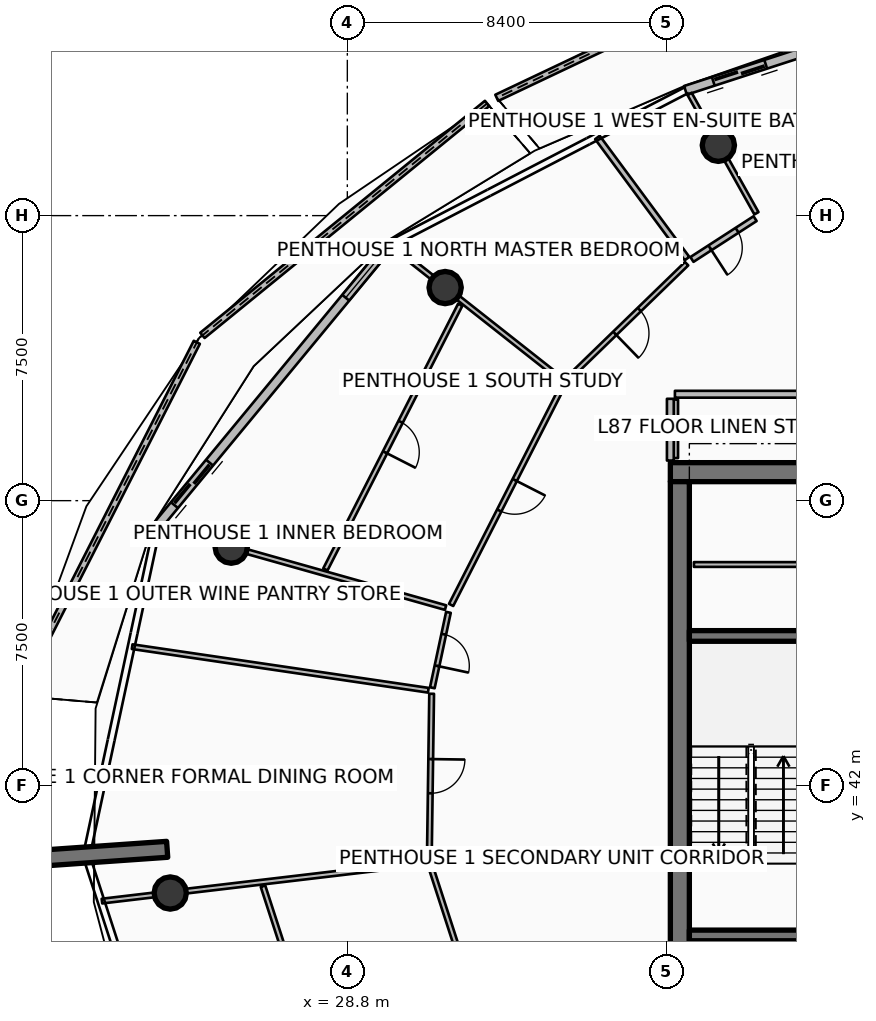
"""IFC4 building model, lengths in metres.
Left out: names, types, materials, properties, quantities, classifications, styles, units other than length and angle.
Written with IfcOpenShell. Run it as: python <this file> out.ifc"""

import sys

from ifc_helpers import new_model, si_unit, direction, frame, frame_2d, origin, origin_2d, place, context, subcontext, project, spatial, polyline, rectangle, circle, outline, extrude, element, fill, save


model = new_model("IFC4")
c1 = context("Model", 3, precision=1e-05, world=origin(), true_north=direction((0.0, 1.0)))
c2 = subcontext(c1, "Body", "Model", "MODEL_VIEW")
j1 = project(units=[si_unit("LENGTHUNIT", "METRE"), si_unit("PLANEANGLEUNIT", "RADIAN")], contexts=[c1])
p1 = place(None, origin())
s1 = spatial("IfcSite", under=j1, at=p1, CompositionType="ELEMENT")
p2 = place(p1, origin())
s2 = spatial("IfcBuilding", under=s1, at=p2, CompositionType="ELEMENT")
p3 = place(p2, frame((0.0, 0.0, 347.3)))
s3 = spatial("IfcBuildingStorey", under=s2, at=p3, CompositionType="ELEMENT", Elevation=347.3)
p4 = place(p3, frame((37.3, 50.25, 0.0), z_axis=(0.0, 0.0, 1.0), x_axis=(1.0, 0.0, 0.0)))
e1 = element("IfcWall", 1, at=p4, inside=s3, PredefinedType="SHEAR", context=c2, shape_type="SweptSolid", body=[
    extrude(rectangle(XDim=9.6, YDim=0.5, at=frame_2d((4.8, 0.0))), origin(), (0.0, 0.0, 1.0), 4.2),
])
p5 = place(p3, frame((37.55, 34.0, 0.0), z_axis=(0.0, 0.0, 1.0), x_axis=(0.0, 1.0, 0.0)))
e2 = element("IfcWall", 2, at=p5, inside=s3, PredefinedType="SHEAR", context=c2, shape_type="SweptSolid", body=[
    extrude(rectangle(XDim=16.0, YDim=0.5, at=frame_2d((8.0, 0.0))), origin(), (0.0, 0.0, 1.0), 4.2),
])
for number, where, z_axis, x_axis in (
    (3, (37.8, 38.06, 0.0), (0.0, 0.0, 1.0), (1.0, 0.0, 0.0)),
    (4, (37.8, 45.94, 0.0), (0.0, 0.0, 1.0), (1.0, 0.0, 0.0)),
):
    element("IfcWall", number, at=place(p3, frame(where, z_axis=z_axis, x_axis=x_axis)), inside=s3, PredefinedType="SHEAR", context=c2, shape_type="SweptSolid", body=[
        extrude(rectangle(XDim=3.5, YDim=0.28, at=frame_2d((1.75, 0.0))), origin(), (0.0, 0.0, 1.0), 4.2),
    ])
p6 = place(p3, frame((24.059, 40.326, 0.0), z_axis=(0.0, 0.0, 1.0), x_axis=(-0.997564163539, -0.069754853754, 0.0)))
e5 = element("IfcWall", 5, at=p6, inside=s3, PredefinedType="SOLIDWALL", context=c2, shape_type="SweptSolid", body=[
    extrude(rectangle(XDim=3.5, YDim=0.42, at=frame_2d((1.75, 0.0))), origin(), (0.0, 0.0, 1.0), 4.2),
])
p7 = place(p3, frame((38.563, 58.851, 0.0), z_axis=(0.1069476294, -0.19095104288, 0.975756067769), x_axis=(0.872476708142, 0.488655700621, 0.0)))
e6 = element("IfcColumn", 6, at=p7, inside=s3, PredefinedType="COLUMN", context=c2, shape_type="SweptSolid", body=[
    extrude(circle(Radius=0.425, at=origin_2d()), origin(), (0.0, 0.0, 1.0), 3.895),
])
p8 = place(p3, frame((31.374, 55.107, 0.0), z_axis=(0.187539260208, -0.147797906664, 0.971074046953), x_axis=(0.618974809296, 0.785410838642, 0.0)))
e7 = element("IfcColumn", 7, at=p8, inside=s3, PredefinedType="COLUMN", context=c2, shape_type="SweptSolid", body=[
    extrude(circle(Radius=0.425, at=origin_2d()), origin(), (0.0, 0.0, 1.0), 3.913),
])
p9 = place(p3, frame((25.744, 48.277, 0.0), z_axis=(0.249679030359, -0.070361834102, 0.965768913406), x_axis=(0.27124427314, 0.96251054243, 0.0)))
e8 = element("IfcColumn", 8, at=p9, inside=s3, PredefinedType="COLUMN", context=c2, shape_type="SweptSolid", body=[
    extrude(circle(Radius=0.425, at=origin_2d()), origin(), (0.0, 0.0, 1.0), 3.935),
])
p10 = place(p3, frame((24.14, 39.176, 0.0), z_axis=(0.266957826391, 0.031621569144, 0.963189283212), x_axis=(-0.117629213307, 0.993057585529, 0.0)))
e9 = element("IfcColumn", 9, at=p10, inside=s3, PredefinedType="COLUMN", context=c2, shape_type="SweptSolid", body=[
    extrude(circle(Radius=0.425, at=origin_2d()), origin(), (0.0, 0.0, 1.0), 3.945),
])
p11 = place(p3, frame((40.758, 63.905, 0.0), z_axis=(0.0, 0.0, 1.0), x_axis=(-0.903556417481, -0.428469135912, 0.0)))
e10 = element("IfcWall", 10, at=p11, inside=s3, PredefinedType="PARAPET", context=c2, shape_type="SweptSolid", body=[
    extrude(outline(polyline([(0.0, 0.0), (8.882, 0.0), (8.882, 1.233), (4.441, 1.418), (0.0, 1.632), (0.0, 0.0)])), frame((0.0, 0.09, 0.0), z_axis=(0.0, -1.0, 0.0), x_axis=(1.0, 0.0, 0.0)), (0.0, 0.0, 1.0), 0.18),
])
p12 = place(p3, frame((32.478, 59.951, 0.0), z_axis=(0.0, 0.0, 1.0), x_axis=(-0.775308764642, -0.631582393255, 0.0)))
e11 = element("IfcWall", 11, at=p12, inside=s3, PredefinedType="PARAPET", context=c2, shape_type="SweptSolid", body=[
    extrude(outline(polyline([(0.0, 0.0), (9.662, 0.0), (9.662, 1.148), (4.831, 1.127), (0.0, 1.224), (0.0, 0.0)])), frame((0.0, 0.09, 0.0), z_axis=(0.0, -1.0, 0.0), x_axis=(1.0, 0.0, 0.0)), (0.0, 0.0, 1.0), 0.18),
])
p13 = place(p3, frame((24.84, 53.666, 0.0), z_axis=(0.0, 0.0, 1.0), x_axis=(-0.453352558269, -0.891331284041, 0.0)))
e12 = element("IfcWall", 12, at=p13, inside=s3, PredefinedType="PARAPET", context=c2, shape_type="SweptSolid", body=[
    extrude(outline(polyline([(0.0, 0.0), (10.433, 0.0), (10.433, 1.483), (5.217, 1.284), (0.0, 1.148), (0.0, 0.0)])), frame((0.0, 0.09, 0.0), z_axis=(0.0, -1.0, 0.0), x_axis=(1.0, 0.0, 0.0)), (0.0, 0.0, 1.0), 0.18),
])
p14 = place(p3, frame((45.581, 62.857, 0.0), z_axis=(0.0, 0.0, 1.0), x_axis=(-0.951053547111, -0.309026132434, 0.0)))
e13 = element("IfcWall", 13, at=p14, inside=s3, PredefinedType="SOLIDWALL", context=c2, shape_type="SweptSolid", body=[
    extrude(rectangle(XDim=8.289, YDim=0.24, at=frame_2d((4.145, 0.0))), origin(), (0.0, 0.0, 1.0), 2.75),
])
p15 = place(p14, frame((6.069, 0.0, 0.0)))
e14 = element("IfcOpeningElement", 14, at=p15, cuts=e13, PredefinedType="OPENING", context=c2, shape_type="SweptSolid", body=[
    extrude(rectangle(XDim=1.45, YDim=2.15, at=frame_2d((0.725, 1.075))), frame((0.0, 0.13, 0.0), z_axis=(0.0, -1.0, 0.0), x_axis=(1.0, 0.0, 0.0)), (0.0, 0.0, 1.0), 0.26),
])
p16 = place(p14, frame((0.28, 0.0, 0.65)))
e15 = element("IfcOpeningElement", 15, at=p16, cuts=e13, PredefinedType="OPENING", context=c2, shape_type="SweptSolid", body=[
    extrude(rectangle(XDim=1.6, YDim=1.5, at=frame_2d((0.8, 0.75))), frame((0.0, 0.13, 0.0), z_axis=(0.0, -1.0, 0.0), x_axis=(1.0, 0.0, 0.0)), (0.0, 0.0, 1.0), 0.26),
])
p17 = place(p3, frame((29.955, 56.289, 0.0), z_axis=(0.0, 0.0, 1.0), x_axis=(-0.636803612721, -0.771026042897, 0.0)))
e16 = element("IfcWall", 16, at=p17, inside=s3, PredefinedType="SOLIDWALL", context=c2, shape_type="SweptSolid", body=[
    extrude(rectangle(XDim=9.728, YDim=0.24, at=frame_2d((4.864, 0.0))), origin(), (0.0, 0.0, 1.0), 2.75),
])
p18 = place(p17, frame((7.508, 0.0, 0.0)))
e17 = element("IfcOpeningElement", 17, at=p18, cuts=e16, PredefinedType="OPENING", context=c2, shape_type="SweptSolid", body=[
    extrude(rectangle(XDim=1.45, YDim=2.15, at=frame_2d((0.725, 1.075))), frame((0.0, 0.13, 0.0), z_axis=(0.0, -1.0, 0.0), x_axis=(1.0, 0.0, 0.0)), (0.0, 0.0, 1.0), 0.26),
])
p19 = place(p17, frame((0.28, 0.0, 0.65)))
e18 = element("IfcOpeningElement", 18, at=p19, cuts=e16, PredefinedType="OPENING", context=c2, shape_type="SweptSolid", body=[
    extrude(rectangle(XDim=1.6, YDim=1.5, at=frame_2d((0.8, 0.75))), frame((0.0, 0.13, 0.0), z_axis=(0.0, -1.0, 0.0), x_axis=(1.0, 0.0, 0.0)), (0.0, 0.0, 1.0), 0.26),
])
p20 = place(p3, frame((37.92, 47.82, 0.0), z_axis=(0.0, 0.0, 1.0), x_axis=(1.0, 0.0, 0.0)))
e19 = element("IfcWall", 19, at=p20, inside=s3, PredefinedType="PARTITIONING", context=c2, shape_type="SweptSolid", body=[
    extrude(rectangle(XDim=8.78, YDim=0.125, at=frame_2d((4.39, 0.0))), origin(), (0.0, 0.0, 1.0), 3.24),
])
p21 = place(p20, frame((3.965, 0.0, 0.0)))
e20 = element("IfcOpeningElement", 20, at=p21, cuts=e19, PredefinedType="OPENING", context=c2, shape_type="SweptSolid", body=[
    extrude(rectangle(XDim=0.85, YDim=2.06, at=frame_2d((0.425, 1.03))), frame((0.0, 0.073, 0.0), z_axis=(0.0, -1.0, 0.0), x_axis=(1.0, 0.0, 0.0)), (0.0, 0.0, 1.0), 0.145),
])
p22 = place(p3, frame((37.44, 50.62, 0.0), z_axis=(0.0, 0.0, 1.0), x_axis=(0.0, 1.0, 0.0)))
e21 = element("IfcWall", 21, at=p22, inside=s3, PredefinedType="PARTITIONING", context=c2, shape_type="SweptSolid", body=[
    extrude(rectangle(XDim=1.54, YDim=0.125, at=frame_2d((0.77, 0.0))), origin(), (0.0, 0.0, 1.0), 2.757),
])
p23 = place(p3, frame((42.112, 52.3, 0.0), z_axis=(0.0, 0.0, 1.0), x_axis=(-1.0, 0.0, 0.0)))
e22 = element("IfcWall", 22, at=p23, inside=s3, PredefinedType="PARTITIONING", context=c2, shape_type="SweptSolid", body=[
    extrude(rectangle(XDim=4.692, YDim=0.18, at=frame_2d((2.346, 0.0))), origin(), (0.0, 0.0, 1.0), 2.757),
])
p24 = place(p3, frame((37.3, 52.18, 0.0), z_axis=(0.0, 0.0, 1.0), x_axis=(0.0, -1.0, 0.0)))
e23 = element("IfcWall", 23, at=p24, inside=s3, PredefinedType="PARTITIONING", context=c2, shape_type="SweptSolid", body=[
    extrude(rectangle(XDim=1.625, YDim=0.18, at=frame_2d((0.812, 0.0))), origin(), (0.0, 0.0, 1.0), 2.757),
])
p25 = place(p3, frame((39.565, 57.062, 0.0), z_axis=(0.0, 0.0, 1.0), x_axis=(-0.488617828282, 0.872497918556, 0.0)))
e24 = element("IfcWall", 24, at=p25, inside=s3, PredefinedType="PARTITIONING", context=c2, shape_type="SweptSolid", body=[
    extrude(rectangle(XDim=3.599, YDim=0.125, at=frame_2d((1.8, 0.0))), origin(), (0.0, 0.0, 1.0), 2.757),
])
p26 = place(p3, frame((39.53, 56.92, 0.0), z_axis=(0.0, 0.0, 1.0), x_axis=(-0.839824942878, -0.542857315802, 0.0)))
e25 = element("IfcWall", 25, at=p26, inside=s3, PredefinedType="PARTITIONING", context=c2, shape_type="SweptSolid", body=[
    extrude(rectangle(XDim=1.979, YDim=0.15, at=frame_2d((0.989, 0.0))), origin(), (0.0, 0.0, 1.0), 2.757),
])
p27 = place(p26, frame((0.564, 0.0, 0.0)))
e26 = element("IfcOpeningElement", 26, at=p27, cuts=e25, PredefinedType="OPENING", context=c2, shape_type="SweptSolid", body=[
    extrude(rectangle(XDim=0.85, YDim=2.06, at=frame_2d((0.425, 1.03))), frame((0.0, 0.085, 0.0), z_axis=(0.0, -1.0, 0.0), x_axis=(1.0, 0.0, 0.0)), (0.0, 0.0, 1.0), 0.17),
])
p28 = place(p3, frame((37.739, 55.87, 0.0), z_axis=(0.0, 0.0, 1.0), x_axis=(-0.594773749171, 0.803893144203, 0.0)))
e27 = element("IfcWall", 27, at=p28, inside=s3, PredefinedType="PARTITIONING", context=c2, shape_type="SweptSolid", body=[
    extrude(rectangle(XDim=3.964, YDim=0.15, at=frame_2d((1.982, 0.0))), origin(), (0.0, 0.0, 1.0), 2.775),
])
p29 = place(p3, frame((37.728, 55.735, 0.0), z_axis=(0.0, 0.0, 1.0), x_axis=(-0.717843655189, -0.696204342636, 0.0)))
e28 = element("IfcWall", 28, at=p29, inside=s3, PredefinedType="PARTITIONING", context=c2, shape_type="SweptSolid", body=[
    extrude(rectangle(XDim=4.366, YDim=0.125, at=frame_2d((2.183, 0.0))), origin(), (0.0, 0.0, 1.0), 2.757),
])
p30 = place(p29, frame((1.733, 0.0, 0.0)))
e29 = element("IfcOpeningElement", 29, at=p30, cuts=e28, PredefinedType="OPENING", context=c2, shape_type="SweptSolid", body=[
    extrude(rectangle(XDim=0.9, YDim=2.08, at=frame_2d((0.45, 1.04))), frame((0.0, 0.073, 0.0), z_axis=(0.0, -1.0, 0.0), x_axis=(1.0, 0.0, 0.0)), (0.0, 0.0, 1.0), 0.145),
])
p31 = place(p3, frame((34.443, 52.688, 0.0), z_axis=(0.0, 0.0, 1.0), x_axis=(-0.785329715116, 0.61907773224, 0.0)))
e30 = element("IfcWall", 30, at=p31, inside=s3, PredefinedType="PARTITIONING", context=c2, shape_type="SweptSolid", body=[
    extrude(rectangle(XDim=5.73, YDim=0.125, at=frame_2d((2.865, 0.0))), origin(), (0.0, 0.0, 1.0), 2.757),
])
p32 = place(p3, frame((34.472, 52.528, 0.0), z_axis=(0.0, 0.0, 1.0), x_axis=(-0.453985634683, -0.891009003042, 0.0)))
e31 = element("IfcWall", 31, at=p32, inside=s3, PredefinedType="PARTITIONING", context=c2, shape_type="SweptSolid", body=[
    extrude(rectangle(XDim=6.477, YDim=0.125, at=frame_2d((3.238, 0.0))), origin(), (0.0, 0.0, 1.0), 2.757),
])
p33 = place(p32, frame((2.788, 0.0, 0.0)))
e32 = element("IfcOpeningElement", 32, at=p33, cuts=e31, PredefinedType="OPENING", context=c2, shape_type="SweptSolid", body=[
    extrude(rectangle(XDim=0.9, YDim=2.08, at=frame_2d((0.45, 1.04))), frame((0.0, 0.073, 0.0), z_axis=(0.0, -1.0, 0.0), x_axis=(1.0, 0.0, 0.0)), (0.0, 0.0, 1.0), 0.145),
])
p34 = place(p3, frame((31.772, 54.656, 0.0), z_axis=(0.0, 0.0, 1.0), x_axis=(-0.453983318952, -0.891010182946, 0.0)))
e33 = element("IfcWall", 33, at=p34, inside=s3, PredefinedType="PARTITIONING", context=c2, shape_type="SweptSolid", body=[
    extrude(rectangle(XDim=7.818, YDim=0.125, at=frame_2d((3.909, 0.0))), origin(), (0.0, 0.0, 1.0), 2.757),
])
p35 = place(p34, frame((3.459, 0.0, 0.0)))
e34 = element("IfcOpeningElement", 34, at=p35, cuts=e33, PredefinedType="OPENING", context=c2, shape_type="SweptSolid", body=[
    extrude(rectangle(XDim=0.9, YDim=2.08, at=frame_2d((0.45, 1.04))), frame((0.0, 0.073, 0.0), z_axis=(0.0, -1.0, 0.0), x_axis=(1.0, 0.0, 0.0)), (0.0, 0.0, 1.0), 0.145),
])
p36 = place(p3, frame((31.385, 46.686, 0.0), z_axis=(0.0, 0.0, 1.0), x_axis=(-0.962455784847, 0.271438505401, 0.0)))
e35 = element("IfcWall", 35, at=p36, inside=s3, PredefinedType="PARTITIONING", context=c2, shape_type="SweptSolid", body=[
    extrude(rectangle(XDim=7.764, YDim=0.125, at=frame_2d((3.882, 0.0))), origin(), (0.0, 0.0, 1.0), 2.757),
])
p37 = place(p3, frame((30.931, 44.511, 0.0), z_axis=(0.0, 0.0, 1.0), x_axis=(-0.989350078836, 0.145555561584, 0.0)))
e36 = element("IfcWall", 36, at=p37, inside=s3, PredefinedType="PARTITIONING", context=c2, shape_type="SweptSolid", body=[
    extrude(rectangle(XDim=7.877, YDim=0.125, at=frame_2d((3.938, 0.0))), origin(), (0.0, 0.0, 1.0), 2.775),
])
p38 = place(p3, frame((31.46, 46.561, 0.0), z_axis=(0.0, 0.0, 1.0), x_axis=(-0.208871695371, -0.977943052981, 0.0)))
e37 = element("IfcWall", 37, at=p38, inside=s3, PredefinedType="PARTITIONING", context=c2, shape_type="SweptSolid", body=[
    extrude(rectangle(XDim=2.029, YDim=0.125, at=frame_2d((1.015, 0.0))), origin(), (0.0, 0.0, 1.0), 2.757),
])
p39 = place(p38, frame((0.59, 0.0, 0.0)))
e38 = element("IfcOpeningElement", 38, at=p39, cuts=e37, PredefinedType="OPENING", context=c2, shape_type="SweptSolid", body=[
    extrude(rectangle(XDim=0.85, YDim=2.06, at=frame_2d((0.425, 1.03))), frame((0.0, 0.073, 0.0), z_axis=(0.0, -1.0, 0.0), x_axis=(1.0, 0.0, 0.0)), (0.0, 0.0, 1.0), 0.145),
])
p40 = place(p3, frame((31.019, 44.418, 0.0), z_axis=(0.0, 0.0, 1.0), x_axis=(-0.014133062898, -0.999900123279, 0.0)))
e39 = element("IfcWall", 39, at=p40, inside=s3, PredefinedType="PARTITIONING", context=c2, shape_type="SweptSolid", body=[
    extrude(rectangle(XDim=4.336, YDim=0.125, at=frame_2d((2.168, 0.0))), origin(), (0.0, 0.0, 1.0), 2.757),
])
p41 = place(p40, frame((1.718, 0.0, 0.0)))
e40 = element("IfcOpeningElement", 40, at=p41, cuts=e39, PredefinedType="OPENING", context=c2, shape_type="SweptSolid", body=[
    extrude(rectangle(XDim=0.9, YDim=2.08, at=frame_2d((0.45, 1.04))), frame((0.0, 0.073, 0.0), z_axis=(0.0, -1.0, 0.0), x_axis=(1.0, 0.0, 0.0)), (0.0, 0.0, 1.0), 0.145),
])
p42 = place(p3, frame((30.857, 39.971, 0.0), z_axis=(0.0, 0.0, 1.0), x_axis=(-0.993069304007, -0.117530240533, 0.0)))
e41 = element("IfcWall", 41, at=p42, inside=s3, PredefinedType="PARTITIONING", context=c2, shape_type="SweptSolid", body=[
    extrude(rectangle(XDim=8.573, YDim=0.125, at=frame_2d((4.286, 0.0))), origin(), (0.0, 0.0, 1.0), 2.757),
])
p43 = place(p3, frame((30.99, 39.878, 0.0), z_axis=(0.0, 0.0, 1.0), x_axis=(0.309026406972, -0.951053457905, 0.0)))
e42 = element("IfcWall", 42, at=p43, inside=s3, PredefinedType="PARTITIONING", context=c2, shape_type="SweptSolid", body=[
    extrude(rectangle(XDim=6.477, YDim=0.125, at=frame_2d((3.238, 0.0))), origin(), (0.0, 0.0, 1.0), 2.757),
])
p44 = place(p43, frame((2.788, 0.0, 0.0)))
e43 = element("IfcOpeningElement", 43, at=p44, cuts=e42, PredefinedType="OPENING", context=c2, shape_type="SweptSolid", body=[
    extrude(rectangle(XDim=0.9, YDim=2.08, at=frame_2d((0.45, 1.04))), frame((0.0, 0.073, 0.0), z_axis=(0.0, -1.0, 0.0), x_axis=(1.0, 0.0, 0.0)), (0.0, 0.0, 1.0), 0.145),
])
p45 = place(p3, frame((26.581, 39.356, 0.0), z_axis=(0.0, 0.0, 1.0), x_axis=(0.309000666789, -0.951061821294, 0.0)))
e44 = element("IfcWall", 44, at=p45, inside=s3, PredefinedType="PARTITIONING", context=c2, shape_type="SweptSolid", body=[
    extrude(rectangle(XDim=8.209, YDim=0.125, at=frame_2d((4.104, 0.0))), origin(), (0.0, 0.0, 1.0), 2.757),
])
p46 = place(p45, frame((3.655, 0.0, 0.0)))
e45 = element("IfcOpeningElement", 45, at=p46, cuts=e44, PredefinedType="OPENING", context=c2, shape_type="SweptSolid", body=[
    extrude(rectangle(XDim=0.9, YDim=2.08, at=frame_2d((0.45, 1.04))), frame((0.0, 0.073, 0.0), z_axis=(0.0, -1.0, 0.0), x_axis=(1.0, 0.0, 0.0)), (0.0, 0.0, 1.0), 0.145),
])
p47 = place(p15, origin())
e46 = element("IfcDoor", 46, at=p47, inside=s3, OperationType="DOUBLE_DOOR_SLIDING", PredefinedType="DOOR", context=c2, shape_type="SweptSolid", body=[
    extrude(rectangle(XDim=1.45, YDim=2.15, at=frame_2d((0.725, 1.075))), frame((0.0, 0.025, 0.0), z_axis=(0.0, -1.0, 0.0), x_axis=(1.0, 0.0, 0.0)), (0.0, 0.0, 1.0), 0.05),
])
fill(e14, e46)
p48 = place(p18, origin())
e47 = element("IfcDoor", 47, at=p48, inside=s3, OperationType="DOUBLE_DOOR_SLIDING", PredefinedType="DOOR", context=c2, shape_type="SweptSolid", body=[
    extrude(rectangle(XDim=1.45, YDim=2.15, at=frame_2d((0.725, 1.075))), frame((0.0, 0.025, 0.0), z_axis=(0.0, -1.0, 0.0), x_axis=(1.0, 0.0, 0.0)), (0.0, 0.0, 1.0), 0.05),
])
fill(e17, e47)
p49 = place(p19, origin())
e48 = element("IfcWindow", 48, at=p49, inside=s3, PartitioningType="SINGLE_PANEL", PredefinedType="WINDOW", context=c2, shape_type="SweptSolid", body=[
    extrude(rectangle(XDim=1.6, YDim=1.5, at=frame_2d((0.8, 0.75))), frame((0.0, 0.03, 0.0), z_axis=(0.0, -1.0, 0.0), x_axis=(1.0, 0.0, 0.0)), (0.0, 0.0, 1.0), 0.06),
])
fill(e18, e48)
p50 = place(p27, origin())
e49 = element("IfcDoor", 49, at=p50, inside=s3, OperationType="SINGLE_SWING_RIGHT", PredefinedType="DOOR", context=c2, shape_type="SweptSolid", body=[
    extrude(rectangle(XDim=0.85, YDim=2.06, at=frame_2d((0.425, 1.03))), frame((0.0, 0.025, 0.0), z_axis=(0.0, -1.0, 0.0), x_axis=(1.0, 0.0, 0.0)), (0.0, 0.0, 1.0), 0.05),
])
fill(e26, e49)
p51 = place(p30, origin())
e50 = element("IfcDoor", 50, at=p51, inside=s3, OperationType="SINGLE_SWING_RIGHT", PredefinedType="DOOR", context=c2, shape_type="SweptSolid", body=[
    extrude(rectangle(XDim=0.9, YDim=2.08, at=frame_2d((0.45, 1.04))), frame((0.0, 0.025, 0.0), z_axis=(0.0, -1.0, 0.0), x_axis=(1.0, 0.0, 0.0)), (0.0, 0.0, 1.0), 0.05),
])
fill(e29, e50)
p52 = place(p33, origin())
e51 = element("IfcDoor", 51, at=p52, inside=s3, OperationType="SINGLE_SWING_LEFT", PredefinedType="DOOR", context=c2, shape_type="SweptSolid", body=[
    extrude(rectangle(XDim=0.9, YDim=2.08, at=frame_2d((0.45, 1.04))), frame((0.0, 0.025, 0.0), z_axis=(0.0, -1.0, 0.0), x_axis=(1.0, 0.0, 0.0)), (0.0, 0.0, 1.0), 0.05),
])
fill(e32, e51)
p53 = place(p35, origin())
e52 = element("IfcDoor", 52, at=p53, inside=s3, OperationType="SINGLE_SWING_RIGHT", PredefinedType="DOOR", context=c2, shape_type="SweptSolid", body=[
    extrude(rectangle(XDim=0.9, YDim=2.08, at=frame_2d((0.45, 1.04))), frame((0.0, 0.025, 0.0), z_axis=(0.0, -1.0, 0.0), x_axis=(1.0, 0.0, 0.0)), (0.0, 0.0, 1.0), 0.05),
])
fill(e34, e52)
p54 = place(p39, origin())
e53 = element("IfcDoor", 53, at=p54, inside=s3, OperationType="SINGLE_SWING_RIGHT", PredefinedType="DOOR", context=c2, shape_type="SweptSolid", body=[
    extrude(rectangle(XDim=0.85, YDim=2.06, at=frame_2d((0.425, 1.03))), frame((0.0, 0.025, 0.0), z_axis=(0.0, -1.0, 0.0), x_axis=(1.0, 0.0, 0.0)), (0.0, 0.0, 1.0), 0.05),
])
fill(e38, e53)
p55 = place(p41, origin())
e54 = element("IfcDoor", 54, at=p55, inside=s3, OperationType="SINGLE_SWING_LEFT", PredefinedType="DOOR", context=c2, shape_type="SweptSolid", body=[
    extrude(rectangle(XDim=0.9, YDim=2.08, at=frame_2d((0.45, 1.04))), frame((0.0, 0.025, 0.0), z_axis=(0.0, -1.0, 0.0), x_axis=(1.0, 0.0, 0.0)), (0.0, 0.0, 1.0), 0.05),
])
fill(e40, e54)
save(model, sys.argv[1])
